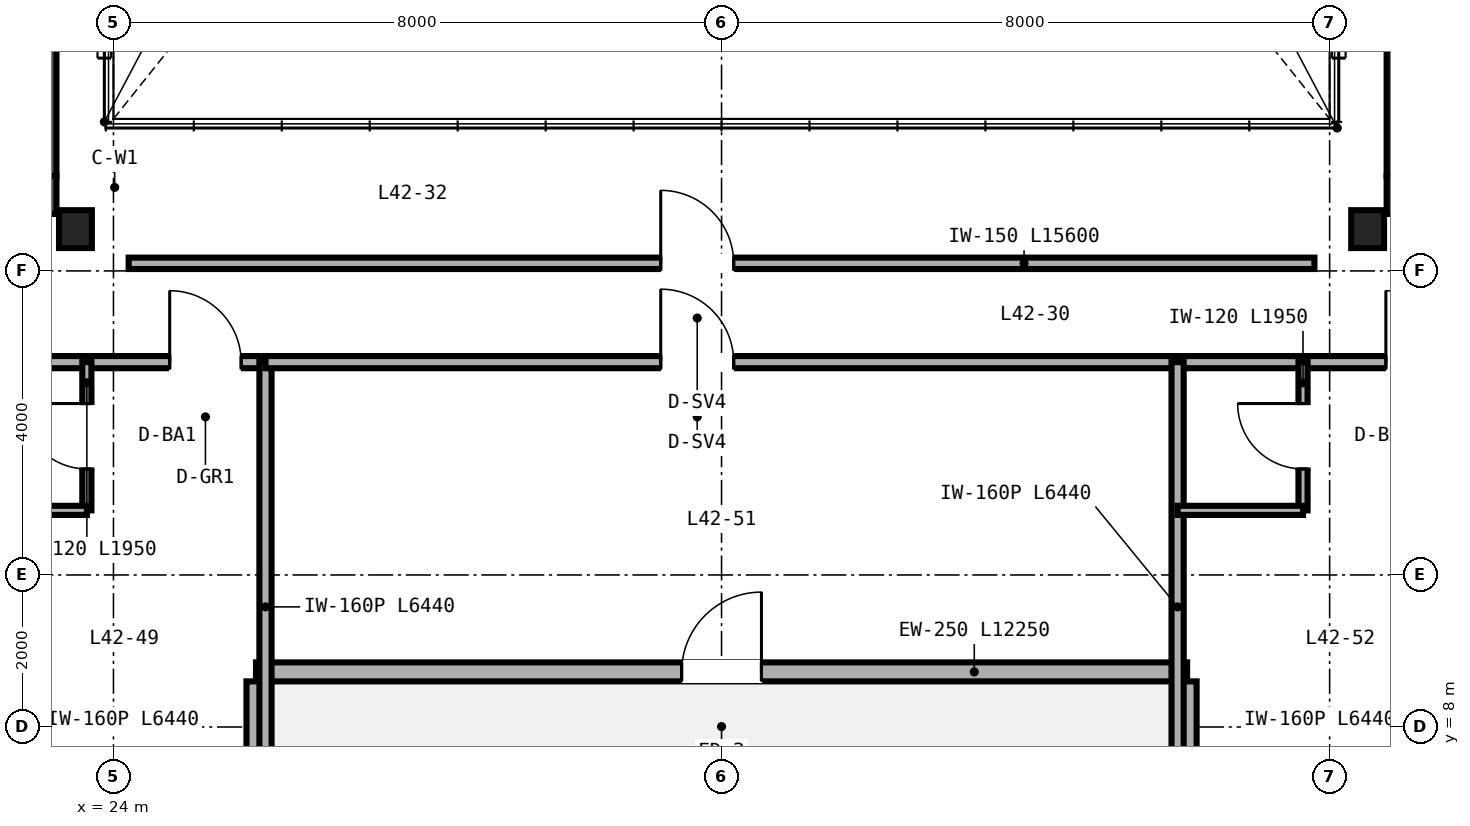
"""IFC4 building model, lengths in metres.
Left out: names, types, materials, properties, quantities, classifications, styles, units other than length and angle.
Written with IfcOpenShell. Run it as: python <this file> out.ifc"""

import sys

from ifc_helpers import new_model, si_unit, direction, frame, frame_2d, origin, origin_2d, place, context, subcontext, project, spatial, rectangle, i_section, extrude, source, transform, mapped, element, fill, save


model = new_model("IFC4")
c1 = context("Model", 3, precision=1e-05, world=origin(), true_north=direction((0.0, 1.0)))
c2 = subcontext(c1, "Body", "Model", "MODEL_VIEW")
j1 = project(units=[si_unit("LENGTHUNIT", "METRE"), si_unit("PLANEANGLEUNIT", "RADIAN")], contexts=[c1])
p1 = place(None, origin())
s1 = spatial("IfcSite", under=j1, at=p1, CompositionType="ELEMENT")
p2 = place(p1, origin())
s2 = spatial("IfcBuilding", under=s1, at=p2, CompositionType="ELEMENT")
p3 = place(p2, frame((0.0, 0.0, 170.4)))
s3 = spatial("IfcBuildingStorey", under=s2, at=p3, CompositionType="ELEMENT", Elevation=170.4)
p4 = place(p3, frame((10.75, 15.0, 0.0), z_axis=(0.0, 0.0, 1.0), x_axis=(1.0, 0.0, 0.0)))
e1 = element("IfcWall", 1, at=p4, inside=s3, PredefinedType="SHEAR", context=c2, shape_type="SweptSolid", body=[
    extrude(rectangle(XDim=12.5, YDim=0.5, at=frame_2d((6.25, 0.0))), origin(), (0.0, 0.0, 1.0), 3.37),
])
p5 = place(p4, frame((8.83, 0.0, 0.0)))
e2 = element("IfcOpeningElement", 2, at=p5, cuts=e1, PredefinedType="OPENING", context=c2, shape_type="SweptSolid", body=[
    extrude(rectangle(XDim=1.0, YDim=2.15, at=frame_2d((0.5, 1.075))), frame((0.0, 0.26, 0.0), z_axis=(0.0, -1.0, 0.0), x_axis=(1.0, 0.0, 0.0)), (0.0, 0.0, 1.0), 0.52),
])
p6 = place(p3, frame((23.0, 15.25, 0.0), z_axis=(0.0, 0.0, 1.0), x_axis=(0.0, 1.0, 0.0)))
e3 = element("IfcWall", 3, at=p6, inside=s3, PredefinedType="SHEAR", context=c2, shape_type="SweptSolid", body=[
    extrude(rectangle(XDim=21.5, YDim=0.5, at=frame_2d((10.75, 0.0))), origin(), (0.0, 0.0, 1.0), 3.37),
])
p7 = place(p3, frame((40.75, 15.0, 0.0), z_axis=(0.0, 0.0, 1.0), x_axis=(1.0, 0.0, 0.0)))
e4 = element("IfcWall", 4, at=p7, inside=s3, PredefinedType="SHEAR", context=c2, shape_type="SweptSolid", body=[
    extrude(rectangle(XDim=12.5, YDim=0.5, at=frame_2d((6.25, 0.0))), origin(), (0.0, 0.0, 1.0), 3.37),
])
p8 = place(p7, frame((4.35, 0.0, 0.0)))
e5 = element("IfcOpeningElement", 5, at=p8, cuts=e4, PredefinedType="OPENING", context=c2, shape_type="SweptSolid", body=[
    extrude(rectangle(XDim=1.0, YDim=2.15, at=frame_2d((0.5, 1.075))), frame((0.0, 0.26, 0.0), z_axis=(0.0, -1.0, 0.0), x_axis=(1.0, 0.0, 0.0)), (0.0, 0.0, 1.0), 0.52),
])
p9 = place(p3, frame((41.0, 15.25, 0.0), z_axis=(0.0, 0.0, 1.0), x_axis=(0.0, 1.0, 0.0)))
e6 = element("IfcWall", 6, at=p9, inside=s3, PredefinedType="SHEAR", context=c2, shape_type="SweptSolid", body=[
    extrude(rectangle(XDim=21.5, YDim=0.5, at=frame_2d((10.75, 0.0))), origin(), (0.0, 0.0, 1.0), 3.37),
])
m1 = source(origin(), c2, "Body", "SweptSolid", [
    extrude(i_section(OverallWidth=0.432, OverallDepth=0.498, WebThickness=0.056, FlangeThickness=0.089, FilletRadius=0.025, at=origin_2d()), origin(), (0.0, 0.0, 1.0), 3.37),
])
for number, where, z_axis, x_axis in (
    (7, (23.5, 14.55, 0.0), (0.0, 0.0, 1.0), (1.0, 0.0, 0.0)),
    (8, (40.5, 14.55, 0.0), (0.0, 0.0, 1.0), (1.0, 0.0, 0.0)),
):
    element("IfcColumn", number, at=place(p3, frame(where, z_axis=z_axis, x_axis=x_axis)), inside=s3, PredefinedType="COLUMN", context=c2, shape_type="MappedRepresentation", body=[
        mapped(m1, transform((0.0, 0.0, 0.0), scale=1.0)),
    ])
p10 = place(p3, frame((25.875, 8.725, 0.0), z_axis=(0.0, 0.0, 1.0), x_axis=(1.0, 0.0, 0.0)))
e9 = element("IfcWall", 9, at=p10, inside=s3, PredefinedType="SOLIDWALL", context=c2, shape_type="SweptSolid", body=[
    extrude(rectangle(XDim=12.25, YDim=0.25, at=frame_2d((6.125, 0.0))), origin(), (0.0, 0.0, 1.0), 3.37),
])
p11 = place(p10, frame((5.6, 0.0, 0.0)))
e10 = element("IfcOpeningElement", 10, at=p11, cuts=e9, PredefinedType="OPENING", context=c2, shape_type="SweptSolid", body=[
    extrude(rectangle(XDim=1.05, YDim=2.15, at=frame_2d((0.525, 1.075))), frame((0.0, 0.135, 0.0), z_axis=(0.0, -1.0, 0.0), x_axis=(1.0, 0.0, 0.0)), (0.0, 0.0, 1.0), 0.27),
])
for number, where, z_axis, x_axis in (
    (11, (25.875, 6.1, 0.0), (0.0, 0.0, 1.0), (0.0, 1.0, 0.0)),
    (12, (38.125, 6.1, 0.0), (0.0, 0.0, 1.0), (0.0, 1.0, 0.0)),
):
    element("IfcWall", number, at=place(p3, frame(where, z_axis=z_axis, x_axis=x_axis)), inside=s3, PredefinedType="SOLIDWALL", context=c2, shape_type="SweptSolid", body=[
        extrude(rectangle(XDim=2.5, YDim=0.25, at=frame_2d((1.25, 0.0))), origin(), (0.0, 0.0, 1.0), 2.443),
    ])
p12 = place(p3, frame((24.2, 14.1, 0.0), z_axis=(0.0, 0.0, 1.0), x_axis=(1.0, 0.0, 0.0)))
e13 = element("IfcWall", 13, at=p12, inside=s3, PredefinedType="PARTITIONING", context=c2, shape_type="SweptSolid", body=[
    extrude(rectangle(XDim=15.6, YDim=0.15, at=frame_2d((7.8, 0.0))), origin(), (0.0, 0.0, 1.0), 3.37),
])
p13 = place(p12, frame((7.0, 0.0, 0.0)))
e14 = element("IfcOpeningElement", 14, at=p13, cuts=e13, PredefinedType="OPENING", context=c2, shape_type="SweptSolid", body=[
    extrude(rectangle(XDim=0.96, YDim=2.15, at=frame_2d((0.48, 1.075))), frame((0.0, 0.085, 0.0), z_axis=(0.0, -1.0, 0.0), x_axis=(1.0, 0.0, 0.0)), (0.0, 0.0, 1.0), 0.17),
])
p14 = place(p3, frame((14.0, 12.8, 0.0), z_axis=(0.0, 0.0, 1.0), x_axis=(1.0, 0.0, 0.0)))
e15 = element("IfcWall", 15, at=p14, inside=s3, PredefinedType="PARTITIONING", context=c2, shape_type="SweptSolid", body=[
    extrude(rectangle(XDim=12.0, YDim=0.16, at=frame_2d((6.0, 0.0))), origin(), (0.0, 0.0, 1.0), 2.913),
])
p15 = place(p14, frame((2.74, 0.0, 0.0)))
e16 = element("IfcOpeningElement", 16, at=p15, cuts=e15, PredefinedType="OPENING", context=c2, shape_type="SweptSolid", body=[
    extrude(rectangle(XDim=0.94, YDim=2.15, at=frame_2d((0.47, 1.075))), frame((0.0, 0.09, 0.0), z_axis=(0.0, -1.0, 0.0), x_axis=(1.0, 0.0, 0.0)), (0.0, 0.0, 1.0), 0.18),
])
p16 = place(p14, frame((6.74, 0.0, 0.0)))
e17 = element("IfcOpeningElement", 17, at=p16, cuts=e15, PredefinedType="OPENING", context=c2, shape_type="SweptSolid", body=[
    extrude(rectangle(XDim=0.94, YDim=2.15, at=frame_2d((0.47, 1.075))), frame((0.0, 0.09, 0.0), z_axis=(0.0, -1.0, 0.0), x_axis=(1.0, 0.0, 0.0)), (0.0, 0.0, 1.0), 0.18),
])
p17 = place(p14, frame((10.74, 0.0, 0.0)))
e18 = element("IfcOpeningElement", 18, at=p17, cuts=e15, PredefinedType="OPENING", context=c2, shape_type="SweptSolid", body=[
    extrude(rectangle(XDim=0.94, YDim=2.15, at=frame_2d((0.47, 1.075))), frame((0.0, 0.09, 0.0), z_axis=(0.0, -1.0, 0.0), x_axis=(1.0, 0.0, 0.0)), (0.0, 0.0, 1.0), 0.18),
])
p18 = place(p3, frame((26.0, 6.36, 0.0), z_axis=(0.0, 0.0, 1.0), x_axis=(0.0, 1.0, 0.0)))
e19 = element("IfcWall", 19, at=p18, inside=s3, PredefinedType="PARTITIONING", context=c2, shape_type="SweptSolid", body=[
    extrude(rectangle(XDim=6.44, YDim=0.16, at=frame_2d((3.22, 0.0))), origin(), (0.0, 0.0, 1.0), 2.443),
])
p19 = place(p3, frame((23.65, 10.85, 0.0), z_axis=(0.0, 0.0, 1.0), x_axis=(0.0, 1.0, 0.0)))
e20 = element("IfcWall", 20, at=p19, inside=s3, PredefinedType="PARTITIONING", context=c2, shape_type="SweptSolid", body=[
    extrude(rectangle(XDim=1.95, YDim=0.12, at=frame_2d((0.975, 0.0))), origin(), (0.0, 0.0, 1.0), 2.913),
])
p20 = place(p19, frame((0.545, 0.0, 0.0)))
e21 = element("IfcOpeningElement", 21, at=p20, cuts=e20, PredefinedType="OPENING", context=c2, shape_type="SweptSolid", body=[
    extrude(rectangle(XDim=0.86, YDim=2.1, at=frame_2d((0.43, 1.05))), frame((0.0, 0.07, 0.0), z_axis=(0.0, -1.0, 0.0), x_axis=(1.0, 0.0, 0.0)), (0.0, 0.0, 1.0), 0.14),
])
p21 = place(p3, frame((22.0, 10.85, 0.0), z_axis=(0.0, 0.0, 1.0), x_axis=(1.0, 0.0, 0.0)))
e22 = element("IfcWall", 22, at=p21, inside=s3, PredefinedType="PARTITIONING", context=c2, shape_type="SweptSolid", body=[
    extrude(rectangle(XDim=1.65, YDim=0.12, at=frame_2d((0.825, 0.0))), origin(), (0.0, 0.0, 1.0), 2.913),
])
p22 = place(p3, frame((26.0, 12.8, 0.0), z_axis=(0.0, 0.0, 1.0), x_axis=(1.0, 0.0, 0.0)))
e23 = element("IfcWall", 23, at=p22, inside=s3, PredefinedType="PARTITIONING", context=c2, shape_type="SweptSolid", body=[
    extrude(rectangle(XDim=12.0, YDim=0.16, at=frame_2d((6.0, 0.0))), origin(), (0.0, 0.0, 1.0), 3.37),
])
p23 = place(p22, frame((5.2, 0.0, 0.0)))
e24 = element("IfcOpeningElement", 24, at=p23, cuts=e23, PredefinedType="OPENING", context=c2, shape_type="SweptSolid", body=[
    extrude(rectangle(XDim=0.96, YDim=2.15, at=frame_2d((0.48, 1.075))), frame((0.0, 0.09, 0.0), z_axis=(0.0, -1.0, 0.0), x_axis=(1.0, 0.0, 0.0)), (0.0, 0.0, 1.0), 0.18),
])
p24 = place(p3, frame((38.0, 12.8, 0.0), z_axis=(0.0, 0.0, 1.0), x_axis=(1.0, 0.0, 0.0)))
e25 = element("IfcWall", 25, at=p24, inside=s3, PredefinedType="PARTITIONING", context=c2, shape_type="SweptSolid", body=[
    extrude(rectangle(XDim=12.0, YDim=0.16, at=frame_2d((6.0, 0.0))), origin(), (0.0, 0.0, 1.0), 2.913),
])
p25 = place(p24, frame((2.74, 0.0, 0.0)))
e26 = element("IfcOpeningElement", 26, at=p25, cuts=e25, PredefinedType="OPENING", context=c2, shape_type="SweptSolid", body=[
    extrude(rectangle(XDim=0.94, YDim=2.15, at=frame_2d((0.47, 1.075))), frame((0.0, 0.09, 0.0), z_axis=(0.0, -1.0, 0.0), x_axis=(1.0, 0.0, 0.0)), (0.0, 0.0, 1.0), 0.18),
])
p26 = place(p24, frame((6.74, 0.0, 0.0)))
e27 = element("IfcOpeningElement", 27, at=p26, cuts=e25, PredefinedType="OPENING", context=c2, shape_type="SweptSolid", body=[
    extrude(rectangle(XDim=0.94, YDim=2.15, at=frame_2d((0.47, 1.075))), frame((0.0, 0.09, 0.0), z_axis=(0.0, -1.0, 0.0), x_axis=(1.0, 0.0, 0.0)), (0.0, 0.0, 1.0), 0.18),
])
p27 = place(p24, frame((10.74, 0.0, 0.0)))
e28 = element("IfcOpeningElement", 28, at=p27, cuts=e25, PredefinedType="OPENING", context=c2, shape_type="SweptSolid", body=[
    extrude(rectangle(XDim=0.94, YDim=2.15, at=frame_2d((0.47, 1.075))), frame((0.0, 0.09, 0.0), z_axis=(0.0, -1.0, 0.0), x_axis=(1.0, 0.0, 0.0)), (0.0, 0.0, 1.0), 0.18),
])
p28 = place(p3, frame((38.0, 6.36, 0.0), z_axis=(0.0, 0.0, 1.0), x_axis=(0.0, 1.0, 0.0)))
e29 = element("IfcWall", 29, at=p28, inside=s3, PredefinedType="PARTITIONING", context=c2, shape_type="SweptSolid", body=[
    extrude(rectangle(XDim=6.44, YDim=0.16, at=frame_2d((3.22, 0.0))), origin(), (0.0, 0.0, 1.0), 2.443),
])
p29 = place(p3, frame((39.65, 10.85, 0.0), z_axis=(0.0, 0.0, 1.0), x_axis=(0.0, 1.0, 0.0)))
e30 = element("IfcWall", 30, at=p29, inside=s3, PredefinedType="PARTITIONING", context=c2, shape_type="SweptSolid", body=[
    extrude(rectangle(XDim=1.95, YDim=0.12, at=frame_2d((0.975, 0.0))), origin(), (0.0, 0.0, 1.0), 3.37),
])
p30 = place(p29, frame((0.545, 0.0, 0.0)))
e31 = element("IfcOpeningElement", 31, at=p30, cuts=e30, PredefinedType="OPENING", context=c2, shape_type="SweptSolid", body=[
    extrude(rectangle(XDim=0.86, YDim=2.1, at=frame_2d((0.43, 1.05))), frame((0.0, 0.07, 0.0), z_axis=(0.0, -1.0, 0.0), x_axis=(1.0, 0.0, 0.0)), (0.0, 0.0, 1.0), 0.14),
])
p31 = place(p3, frame((38.0, 10.85, 0.0), z_axis=(0.0, 0.0, 1.0), x_axis=(1.0, 0.0, 0.0)))
e32 = element("IfcWall", 32, at=p31, inside=s3, PredefinedType="PARTITIONING", context=c2, shape_type="SweptSolid", body=[
    extrude(rectangle(XDim=1.65, YDim=0.12, at=frame_2d((0.825, 0.0))), origin(), (0.0, 0.0, 1.0), 3.37),
])
m2 = source(origin(), c2, "Body", "SweptSolid", [
    extrude(rectangle(XDim=1.05, YDim=2.15, at=frame_2d((0.525, 1.075))), frame((0.0, 0.025, 0.0), z_axis=(0.0, -1.0, 0.0), x_axis=(1.0, 0.0, 0.0)), (0.0, 0.0, 1.0), 0.05),
])
p32 = place(p11, origin())
e33 = element("IfcDoor", 33, at=p32, inside=s3, OperationType="SINGLE_SWING_RIGHT", PredefinedType="DOOR", context=c2, shape_type="MappedRepresentation", body=[
    mapped(m2, transform((0.0, 0.0, 0.0), scale=1.0)),
])
fill(e10, e33)
m3 = source(origin(), c2, "Body", "SweptSolid", [
    extrude(rectangle(XDim=0.96, YDim=2.15, at=frame_2d((0.48, 1.075))), frame((0.0, 0.025, 0.0), z_axis=(0.0, -1.0, 0.0), x_axis=(1.0, 0.0, 0.0)), (0.0, 0.0, 1.0), 0.05),
])
p33 = place(p13, origin())
e34 = element("IfcDoor", 34, at=p33, inside=s3, OperationType="SINGLE_SWING_LEFT", PredefinedType="DOOR", context=c2, shape_type="MappedRepresentation", body=[
    mapped(m3, transform((0.0, 0.0, 0.0), scale=1.0)),
])
fill(e14, e34)
m4 = source(origin(), c2, "Body", "SweptSolid", [
    extrude(rectangle(XDim=0.86, YDim=2.1, at=frame_2d((0.43, 1.05))), frame((0.0, 0.025, 0.0), z_axis=(0.0, -1.0, 0.0), x_axis=(1.0, 0.0, 0.0)), (0.0, 0.0, 1.0), 0.05),
])
p34 = place(p20, origin())
e35 = element("IfcDoor", 35, at=p34, inside=s3, OperationType="SINGLE_SWING_RIGHT", PredefinedType="DOOR", context=c2, shape_type="MappedRepresentation", body=[
    mapped(m4, transform((0.0, 0.0, 0.0), scale=1.0)),
])
fill(e21, e35)
m5 = source(origin(), c2, "Body", "SweptSolid", [
    extrude(rectangle(XDim=0.94, YDim=2.15, at=frame_2d((0.47, 1.075))), frame((0.0, 0.025, 0.0), z_axis=(0.0, -1.0, 0.0), x_axis=(1.0, 0.0, 0.0)), (0.0, 0.0, 1.0), 0.05),
])
p35 = place(p17, origin())
e36 = element("IfcDoor", 36, at=p35, inside=s3, OperationType="SINGLE_SWING_LEFT", PredefinedType="DOOR", context=c2, shape_type="MappedRepresentation", body=[
    mapped(m5, transform((0.0, 0.0, 0.0), scale=1.0)),
])
fill(e18, e36)
p36 = place(p23, origin())
e37 = element("IfcDoor", 37, at=p36, inside=s3, OperationType="SINGLE_SWING_LEFT", PredefinedType="DOOR", context=c2, shape_type="MappedRepresentation", body=[
    mapped(m3, transform((0.0, 0.0, 0.0), scale=1.0)),
])
fill(e24, e37)
p37 = place(p30, origin())
e38 = element("IfcDoor", 38, at=p37, inside=s3, OperationType="SINGLE_SWING_RIGHT", PredefinedType="DOOR", context=c2, shape_type="MappedRepresentation", body=[
    mapped(m4, transform((0.0, 0.0, 0.0), scale=1.0)),
])
fill(e31, e38)
p38 = place(p25, origin())
e39 = element("IfcDoor", 39, at=p38, inside=s3, OperationType="SINGLE_SWING_LEFT", PredefinedType="DOOR", context=c2, shape_type="MappedRepresentation", body=[
    mapped(m5, transform((0.0, 0.0, 0.0), scale=1.0)),
])
fill(e26, e39)
save(model, sys.argv[1])
